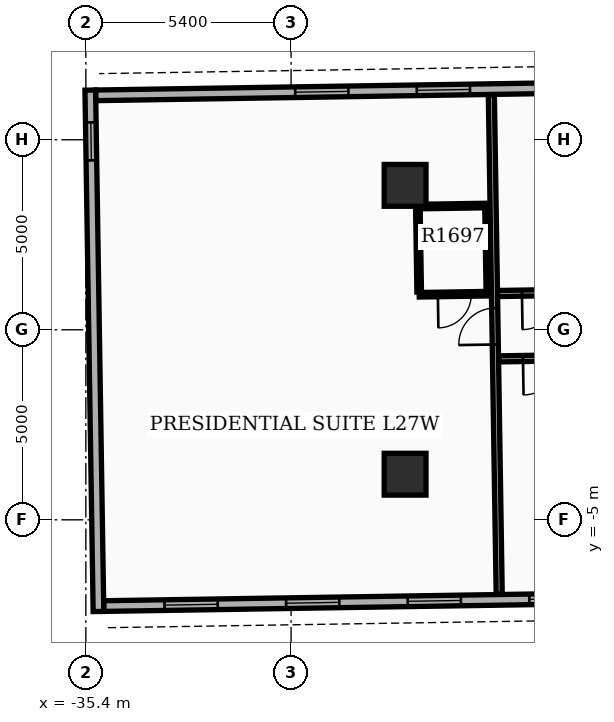
"""IFC4 building model, lengths in metres.
Left out: names, types, materials, properties, quantities, classifications, styles, units other than length and angle.
Written with IfcOpenShell. Run it as: python <this file> out.ifc"""

import sys

from ifc_helpers import new_model, si_unit, direction, frame, frame_2d, origin, origin_2d, place, context, subcontext, project, spatial, rectangle, extrude, element, fill, save


model = new_model("IFC4")
c1 = context("Model", 3, precision=1e-05, world=origin(), true_north=direction((0.0, 1.0)))
c2 = subcontext(c1, "Body", "Model", "MODEL_VIEW")
j1 = project(units=[si_unit("LENGTHUNIT", "METRE"), si_unit("PLANEANGLEUNIT", "RADIAN")], contexts=[c1])
p1 = place(None, origin())
s1 = spatial("IfcSite", under=j1, at=p1, CompositionType="ELEMENT")
p2 = place(p1, origin())
s2 = spatial("IfcBuilding", under=s1, at=p2, CompositionType="ELEMENT")
p3 = place(p2, frame((0.0, 0.0, 108.6)))
s3 = spatial("IfcBuildingStorey", under=s2, at=p3, CompositionType="ELEMENT", Elevation=108.6)
for number, where, z_axis, x_axis in (
    (1, (-27.0, -3.8, 0.0), (0.0, 0.0, 1.0), (1.0, 0.0, 0.0)),
    (2, (-27.0, 3.8, 0.0), (0.0, 0.0, 1.0), (1.0, 0.0, 0.0)),
):
    element("IfcColumn", number, at=place(p3, frame(where, z_axis=z_axis, x_axis=x_axis)), inside=s3, PredefinedType="COLUMN", context=c2, shape_type="SweptSolid", body=[
        extrude(rectangle(XDim=1.1, YDim=1.1, at=origin_2d()), origin(), (0.0, 0.0, 1.0), 3.9),
    ])
p4 = place(p3, frame((-15.044, 6.485, 0.0), z_axis=(0.0, 0.0, 1.0), x_axis=(-0.999876474133, -0.01571739401, 0.0)))
e3 = element("IfcWall", 3, at=p4, inside=s3, PredefinedType="STANDARD", context=c2, shape_type="SweptSolid", body=[
    extrude(rectangle(XDim=20.1, YDim=0.28, at=frame_2d((10.05, 0.0))), origin(), (0.0, 0.0, 1.0), 2.97),
])
p5 = place(p4, frame((1.6, 0.0, 0.8)))
e4 = element("IfcOpeningElement", 4, at=p5, cuts=e3, PredefinedType="OPENING", context=c2, shape_type="SweptSolid", body=[
    extrude(rectangle(XDim=1.4, YDim=1.6, at=frame_2d((0.7, 0.8))), frame((0.0, 0.15, 0.0), z_axis=(0.0, -1.0, 0.0), x_axis=(1.0, 0.0, 0.0)), (0.0, 0.0, 1.0), 0.3),
])
p6 = place(p4, frame((6.55, 0.0, 0.8)))
e5 = element("IfcOpeningElement", 5, at=p6, cuts=e3, PredefinedType="OPENING", context=c2, shape_type="SweptSolid", body=[
    extrude(rectangle(XDim=1.4, YDim=1.6, at=frame_2d((0.7, 0.8))), frame((0.0, 0.15, 0.0), z_axis=(0.0, -1.0, 0.0), x_axis=(1.0, 0.0, 0.0)), (0.0, 0.0, 1.0), 0.3),
])
p7 = place(p4, frame((10.25, 0.0, 0.8)))
e6 = element("IfcOpeningElement", 6, at=p7, cuts=e3, PredefinedType="OPENING", context=c2, shape_type="SweptSolid", body=[
    extrude(rectangle(XDim=1.4, YDim=1.6, at=frame_2d((0.7, 0.8))), frame((0.0, 0.15, 0.0), z_axis=(0.0, -1.0, 0.0), x_axis=(1.0, 0.0, 0.0)), (0.0, 0.0, 1.0), 0.3),
])
p8 = place(p4, frame((13.45, 0.0, 0.8)))
e7 = element("IfcOpeningElement", 7, at=p8, cuts=e3, PredefinedType="OPENING", context=c2, shape_type="SweptSolid", body=[
    extrude(rectangle(XDim=1.4, YDim=1.6, at=frame_2d((0.7, 0.8))), frame((0.0, 0.15, 0.0), z_axis=(0.0, -1.0, 0.0), x_axis=(1.0, 0.0, 0.0)), (0.0, 0.0, 1.0), 0.3),
])
p9 = place(p3, frame((-34.93, -7.27, 0.0), z_axis=(0.0, 0.0, 1.0), x_axis=(0.999876667941, 0.015705059908, 0.0)))
e8 = element("IfcWall", 8, at=p9, inside=s3, PredefinedType="STANDARD", context=c2, shape_type="SweptSolid", body=[
    extrude(rectangle(XDim=20.1, YDim=0.28, at=frame_2d((10.05, 0.0))), origin(), (0.0, 0.0, 1.0), 2.97),
])
p10 = place(p9, frame((1.6, 0.0, 0.8)))
e9 = element("IfcOpeningElement", 9, at=p10, cuts=e8, PredefinedType="OPENING", context=c2, shape_type="SweptSolid", body=[
    extrude(rectangle(XDim=1.4, YDim=1.6, at=frame_2d((0.7, 0.8))), frame((0.0, 0.15, 0.0), z_axis=(0.0, -1.0, 0.0), x_axis=(1.0, 0.0, 0.0)), (0.0, 0.0, 1.0), 0.3),
])
p11 = place(p9, frame((4.8, 0.0, 0.8)))
e10 = element("IfcOpeningElement", 10, at=p11, cuts=e8, PredefinedType="OPENING", context=c2, shape_type="SweptSolid", body=[
    extrude(rectangle(XDim=1.4, YDim=1.6, at=frame_2d((0.7, 0.8))), frame((0.0, 0.15, 0.0), z_axis=(0.0, -1.0, 0.0), x_axis=(1.0, 0.0, 0.0)), (0.0, 0.0, 1.0), 0.3),
])
p12 = place(p9, frame((8.0, 0.0, 0.8)))
e11 = element("IfcOpeningElement", 11, at=p12, cuts=e8, PredefinedType="OPENING", context=c2, shape_type="SweptSolid", body=[
    extrude(rectangle(XDim=1.4, YDim=1.6, at=frame_2d((0.7, 0.8))), frame((0.0, 0.15, 0.0), z_axis=(0.0, -1.0, 0.0), x_axis=(1.0, 0.0, 0.0)), (0.0, 0.0, 1.0), 0.3),
])
p13 = place(p9, frame((11.2, 0.0, 0.8)))
e12 = element("IfcOpeningElement", 12, at=p13, cuts=e8, PredefinedType="OPENING", context=c2, shape_type="SweptSolid", body=[
    extrude(rectangle(XDim=1.4, YDim=1.6, at=frame_2d((0.7, 0.8))), frame((0.0, 0.15, 0.0), z_axis=(0.0, -1.0, 0.0), x_axis=(1.0, 0.0, 0.0)), (0.0, 0.0, 1.0), 0.3),
])
p14 = place(p9, frame((15.0, 0.0, 0.0)))
e13 = element("IfcOpeningElement", 13, at=p14, cuts=e8, PredefinedType="OPENING", context=c2, shape_type="SweptSolid", body=[
    extrude(rectangle(XDim=0.96, YDim=2.1, at=frame_2d((0.48, 1.05))), frame((0.0, 0.15, 0.0), z_axis=(0.0, -1.0, 0.0), x_axis=(1.0, 0.0, 0.0)), (0.0, 0.0, 1.0), 0.3),
])
p15 = place(p3, frame((-35.283, 6.307, 0.0), z_axis=(0.0, 0.0, 1.0), x_axis=(0.015712599986, -0.999876549481, 0.0)))
e14 = element("IfcWall", 14, at=p15, inside=s3, PredefinedType="STANDARD", context=c2, shape_type="SweptSolid", body=[
    extrude(rectangle(XDim=13.72, YDim=0.28, at=frame_2d((6.86, 0.0))), origin(), (0.0, 0.0, 1.0), 2.97),
])
p16 = place(p15, frame((0.85, 0.0, 0.85)))
e15 = element("IfcOpeningElement", 15, at=p16, cuts=e14, PredefinedType="OPENING", context=c2, shape_type="SweptSolid", body=[
    extrude(rectangle(XDim=1.0, YDim=1.5, at=frame_2d((0.5, 0.75))), frame((0.0, 0.15, 0.0), z_axis=(0.0, -1.0, 0.0), x_axis=(1.0, 0.0, 0.0)), (0.0, 0.0, 1.0), 0.3),
])
p17 = place(p3, frame((-14.869, 1.107, 0.0), z_axis=(0.0, 0.0, 1.0), x_axis=(-0.999876269181, -0.015730426869, 0.0)))
e16 = element("IfcWall", 16, at=p17, inside=s3, PredefinedType="PARTITIONING", context=c2, shape_type="SweptSolid", body=[
    extrude(rectangle(XDim=9.7, YDim=0.16, at=frame_2d((4.85, 0.0))), origin(), (0.0, 0.0, 1.0), 2.96),
])
p18 = place(p17, frame((2.575, 0.0, 0.0)))
e17 = element("IfcOpeningElement", 17, at=p18, cuts=e16, PredefinedType="OPENING", context=c2, shape_type="SweptSolid", body=[
    extrude(rectangle(XDim=0.96, YDim=2.15, at=frame_2d((0.48, 1.075))), frame((0.0, 0.09, 0.0), z_axis=(0.0, -1.0, 0.0), x_axis=(1.0, 0.0, 0.0)), (0.0, 0.0, 1.0), 0.18),
])
p19 = place(p17, frame((8.097, 0.0, 0.0)))
e18 = element("IfcOpeningElement", 18, at=p19, cuts=e16, PredefinedType="OPENING", context=c2, shape_type="SweptSolid", body=[
    extrude(rectangle(XDim=0.96, YDim=2.15, at=frame_2d((0.48, 1.075))), frame((0.0, 0.09, 0.0), z_axis=(0.0, -1.0, 0.0), x_axis=(1.0, 0.0, 0.0)), (0.0, 0.0, 1.0), 0.18),
])
p20 = place(p3, frame((-14.842, -0.613, 0.0), z_axis=(0.0, 0.0, 1.0), x_axis=(-0.999876658521, -0.015705659641, 0.0)))
e19 = element("IfcWall", 19, at=p20, inside=s3, PredefinedType="PARTITIONING", context=c2, shape_type="SweptSolid", body=[
    extrude(rectangle(XDim=9.7, YDim=0.16, at=frame_2d((4.85, 0.0))), origin(), (0.0, 0.0, 1.0), 2.96),
])
p21 = place(p20, frame((2.575, 0.0, 0.0)))
e20 = element("IfcOpeningElement", 20, at=p21, cuts=e19, PredefinedType="OPENING", context=c2, shape_type="SweptSolid", body=[
    extrude(rectangle(XDim=0.96, YDim=2.15, at=frame_2d((0.48, 1.075))), frame((0.0, 0.09, 0.0), z_axis=(0.0, -1.0, 0.0), x_axis=(1.0, 0.0, 0.0)), (0.0, 0.0, 1.0), 0.18),
])
p22 = place(p20, frame((8.097, 0.0, 0.0)))
e21 = element("IfcOpeningElement", 21, at=p22, cuts=e19, PredefinedType="OPENING", context=c2, shape_type="SweptSolid", body=[
    extrude(rectangle(XDim=0.96, YDim=2.15, at=frame_2d((0.48, 1.075))), frame((0.0, 0.09, 0.0), z_axis=(0.0, -1.0, 0.0), x_axis=(1.0, 0.0, 0.0)), (0.0, 0.0, 1.0), 0.18),
])
p23 = place(p3, frame((-24.524, -6.958, 0.0), z_axis=(0.0, 0.0, 1.0), x_axis=(-0.015713911007, 0.999876528878, 0.0)))
e22 = element("IfcWall", 22, at=p23, inside=s3, PredefinedType="PARTITIONING", context=c2, shape_type="SweptSolid", body=[
    extrude(rectangle(XDim=13.144, YDim=0.16, at=frame_2d((6.572, 0.0))), origin(), (0.0, 0.0, 1.0), 2.96),
])
p24 = place(p23, frame((6.572, 0.0, 0.0)))
e23 = element("IfcOpeningElement", 23, at=p24, cuts=e22, PredefinedType="OPENING", context=c2, shape_type="SweptSolid", body=[
    extrude(rectangle(XDim=0.96, YDim=2.15, at=frame_2d((0.48, 1.075))), frame((0.0, 0.09, 0.0), z_axis=(0.0, -1.0, 0.0), x_axis=(1.0, 0.0, 0.0)), (0.0, 0.0, 1.0), 0.18),
])
for number, where, z_axis, x_axis in (
    (24, (-24.809, 1.021, 0.0), (0.0, 0.0, 1.0), (-0.016, 1.0, 0.0)),
    (25, (-26.629, 0.992, 0.0), (0.0, 0.0, 1.0), (-0.016, 1.0, 0.0)),
):
    element("IfcWall", number, at=place(p3, frame(where, z_axis=z_axis, x_axis=x_axis)), inside=s3, PredefinedType="PARTITIONING", context=c2, shape_type="SweptSolid", body=[
        extrude(rectangle(XDim=2.18, YDim=0.12, at=frame_2d((1.09, 0.0))), origin(), (0.0, 0.0, 1.0), 2.96),
    ])
p25 = place(p3, frame((-24.808, 0.95, 0.0), z_axis=(0.0, 0.0, 1.0), x_axis=(-0.999876803258, -0.015696442504, 0.0)))
e26 = element("IfcWall", 26, at=p25, inside=s3, PredefinedType="PARTITIONING", context=c2, shape_type="SweptSolid", body=[
    extrude(rectangle(XDim=1.82, YDim=0.12, at=frame_2d((0.91, 0.0))), origin(), (0.0, 0.0, 1.0), 2.96),
])
p26 = place(p25, frame((0.45, 0.0, 0.0)))
e27 = element("IfcOpeningElement", 27, at=p26, cuts=e26, PredefinedType="OPENING", context=c2, shape_type="SweptSolid", body=[
    extrude(rectangle(XDim=0.88, YDim=2.1, at=frame_2d((0.44, 1.05))), frame((0.0, 0.07, 0.0), z_axis=(0.0, -1.0, 0.0), x_axis=(1.0, 0.0, 0.0)), (0.0, 0.0, 1.0), 0.14),
])
p27 = place(p3, frame((-24.844, 3.27, 0.0), z_axis=(0.0, 0.0, 1.0), x_axis=(-0.999876836305, -0.015694337248, 0.0)))
e28 = element("IfcWall", 28, at=p27, inside=s3, PredefinedType="PARTITIONING", context=c2, shape_type="SweptSolid", body=[
    extrude(rectangle(XDim=1.82, YDim=0.12, at=frame_2d((0.91, 0.0))), origin(), (0.0, 0.0, 1.0), 2.96),
])
p28 = place(p7, origin())
e29 = element("IfcWindow", 29, at=p28, inside=s3, PartitioningType="SINGLE_PANEL", PredefinedType="WINDOW", context=c2, shape_type="SweptSolid", body=[
    extrude(rectangle(XDim=1.4, YDim=1.6, at=frame_2d((0.7, 0.8))), frame((0.0, 0.03, 0.0), z_axis=(0.0, -1.0, 0.0), x_axis=(1.0, 0.0, 0.0)), (0.0, 0.0, 1.0), 0.06),
])
fill(e6, e29)
p29 = place(p8, origin())
e30 = element("IfcWindow", 30, at=p29, inside=s3, PartitioningType="SINGLE_PANEL", PredefinedType="WINDOW", context=c2, shape_type="SweptSolid", body=[
    extrude(rectangle(XDim=1.4, YDim=1.6, at=frame_2d((0.7, 0.8))), frame((0.0, 0.03, 0.0), z_axis=(0.0, -1.0, 0.0), x_axis=(1.0, 0.0, 0.0)), (0.0, 0.0, 1.0), 0.06),
])
fill(e7, e30)
p30 = place(p10, origin())
e31 = element("IfcWindow", 31, at=p30, inside=s3, PartitioningType="SINGLE_PANEL", PredefinedType="WINDOW", context=c2, shape_type="SweptSolid", body=[
    extrude(rectangle(XDim=1.4, YDim=1.6, at=frame_2d((0.7, 0.8))), frame((0.0, 0.03, 0.0), z_axis=(0.0, -1.0, 0.0), x_axis=(1.0, 0.0, 0.0)), (0.0, 0.0, 1.0), 0.06),
])
fill(e9, e31)
p31 = place(p11, origin())
e32 = element("IfcWindow", 32, at=p31, inside=s3, PartitioningType="SINGLE_PANEL", PredefinedType="WINDOW", context=c2, shape_type="SweptSolid", body=[
    extrude(rectangle(XDim=1.4, YDim=1.6, at=frame_2d((0.7, 0.8))), frame((0.0, 0.03, 0.0), z_axis=(0.0, -1.0, 0.0), x_axis=(1.0, 0.0, 0.0)), (0.0, 0.0, 1.0), 0.06),
])
fill(e10, e32)
p32 = place(p12, origin())
e33 = element("IfcWindow", 33, at=p32, inside=s3, PartitioningType="SINGLE_PANEL", PredefinedType="WINDOW", context=c2, shape_type="SweptSolid", body=[
    extrude(rectangle(XDim=1.4, YDim=1.6, at=frame_2d((0.7, 0.8))), frame((0.0, 0.03, 0.0), z_axis=(0.0, -1.0, 0.0), x_axis=(1.0, 0.0, 0.0)), (0.0, 0.0, 1.0), 0.06),
])
fill(e11, e33)
p33 = place(p13, origin())
e34 = element("IfcWindow", 34, at=p33, inside=s3, PartitioningType="SINGLE_PANEL", PredefinedType="WINDOW", context=c2, shape_type="SweptSolid", body=[
    extrude(rectangle(XDim=1.4, YDim=1.6, at=frame_2d((0.7, 0.8))), frame((0.0, 0.03, 0.0), z_axis=(0.0, -1.0, 0.0), x_axis=(1.0, 0.0, 0.0)), (0.0, 0.0, 1.0), 0.06),
])
fill(e12, e34)
p34 = place(p16, origin())
e35 = element("IfcWindow", 35, at=p34, inside=s3, PartitioningType="SINGLE_PANEL", PredefinedType="WINDOW", context=c2, shape_type="SweptSolid", body=[
    extrude(rectangle(XDim=1.0, YDim=1.5, at=frame_2d((0.5, 0.75))), frame((0.0, 0.03, 0.0), z_axis=(0.0, -1.0, 0.0), x_axis=(1.0, 0.0, 0.0)), (0.0, 0.0, 1.0), 0.06),
])
fill(e15, e35)
p35 = place(p19, origin())
e36 = element("IfcDoor", 36, at=p35, inside=s3, OperationType="SINGLE_SWING_RIGHT", PredefinedType="DOOR", context=c2, shape_type="SweptSolid", body=[
    extrude(rectangle(XDim=0.96, YDim=2.15, at=frame_2d((0.48, 1.075))), frame((0.0, 0.025, 0.0), z_axis=(0.0, -1.0, 0.0), x_axis=(1.0, 0.0, 0.0)), (0.0, 0.0, 1.0), 0.05),
])
fill(e18, e36)
p36 = place(p22, origin())
e37 = element("IfcDoor", 37, at=p36, inside=s3, OperationType="SINGLE_SWING_RIGHT", PredefinedType="DOOR", context=c2, shape_type="SweptSolid", body=[
    extrude(rectangle(XDim=0.96, YDim=2.15, at=frame_2d((0.48, 1.075))), frame((0.0, 0.025, 0.0), z_axis=(0.0, -1.0, 0.0), x_axis=(1.0, 0.0, 0.0)), (0.0, 0.0, 1.0), 0.05),
])
fill(e21, e37)
p37 = place(p24, origin())
e38 = element("IfcDoor", 38, at=p37, inside=s3, OperationType="SINGLE_SWING_LEFT", PredefinedType="DOOR", context=c2, shape_type="SweptSolid", body=[
    extrude(rectangle(XDim=0.96, YDim=2.15, at=frame_2d((0.48, 1.075))), frame((0.0, 0.025, 0.0), z_axis=(0.0, -1.0, 0.0), x_axis=(1.0, 0.0, 0.0)), (0.0, 0.0, 1.0), 0.05),
])
fill(e23, e38)
p38 = place(p26, origin())
e39 = element("IfcDoor", 39, at=p38, inside=s3, OperationType="SINGLE_SWING_RIGHT", PredefinedType="DOOR", context=c2, shape_type="SweptSolid", body=[
    extrude(rectangle(XDim=0.88, YDim=2.1, at=frame_2d((0.44, 1.05))), frame((0.0, 0.025, 0.0), z_axis=(0.0, -1.0, 0.0), x_axis=(1.0, 0.0, 0.0)), (0.0, 0.0, 1.0), 0.05),
])
fill(e27, e39)
save(model, sys.argv[1])
